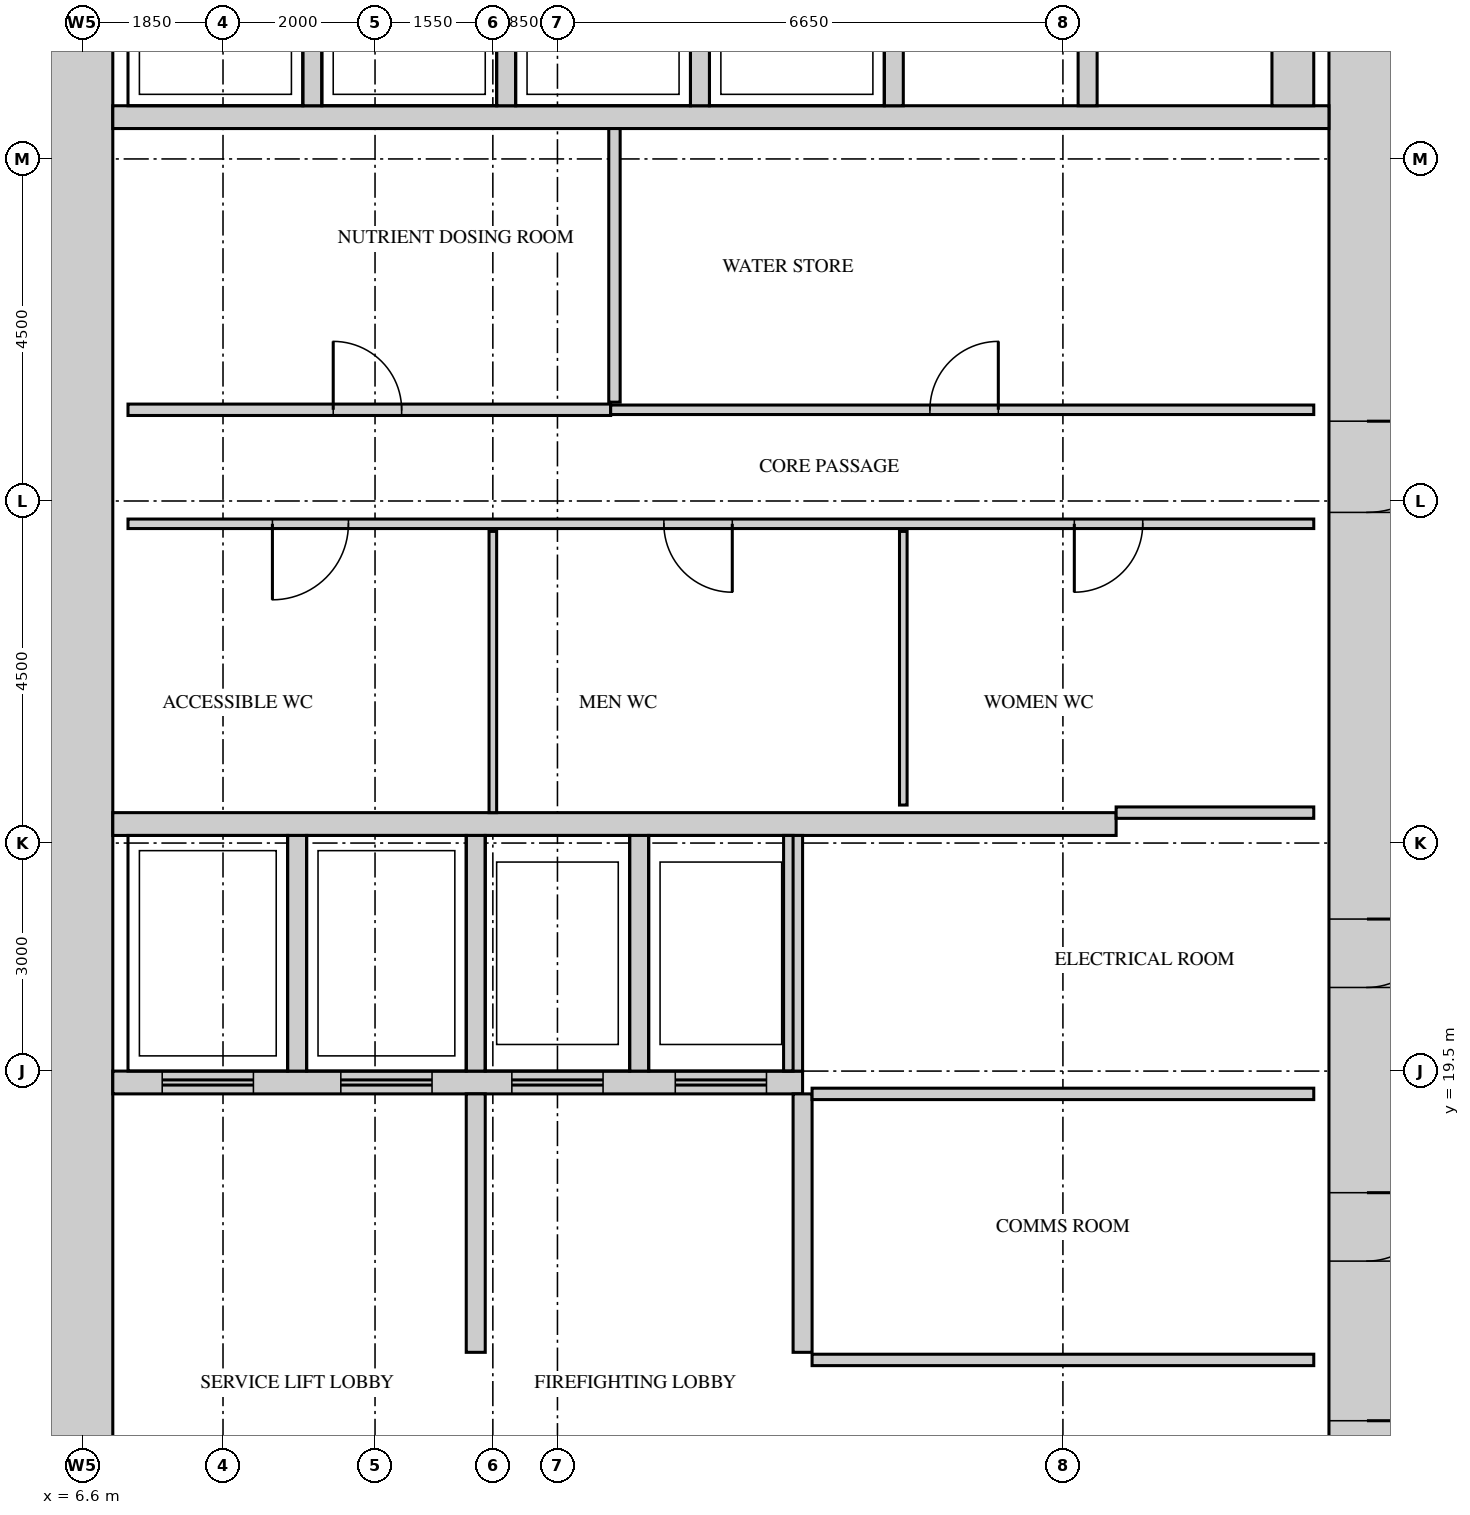
"""IFC4 building model, lengths in metres.
Left out: names, types, materials, properties, quantities, classifications, styles, units other than length and angle.
Written with IfcOpenShell. Run it as: python <this file> out.ifc"""

import sys

from ifc_helpers import new_model, si_unit, direction, frame, frame_2d, origin, place, context, subcontext, project, spatial, rectangle, extrude, source, transform, mapped, element, fill, save


model = new_model("IFC4")
c1 = context("Model", 3, precision=1e-05, world=origin(), true_north=direction((0.0, 1.0)))
c2 = subcontext(c1, "Body", "Model", "MODEL_VIEW")
j1 = project(units=[si_unit("LENGTHUNIT", "METRE"), si_unit("PLANEANGLEUNIT", "RADIAN")], contexts=[c1])
p1 = place(None, origin())
s1 = spatial("IfcSite", under=j1, at=p1, CompositionType="ELEMENT")
p2 = place(p1, origin())
s2 = spatial("IfcBuilding", under=s1, at=p2, CompositionType="ELEMENT")
p3 = place(p2, frame((0.0, 0.0, 110.3)))
s3 = spatial("IfcBuildingStorey", under=s2, at=p3, CompositionType="ELEMENT", Elevation=110.3)
m1 = source(origin(), c2, "Body", "SweptSolid", [
    extrude(rectangle(XDim=28.0, YDim=1.0, at=frame_2d((14.0, 0.0))), origin(), (0.0, 0.0, 1.0), 4.1),
])
p4 = place(p3, frame((23.5, 13.0, 0.0), z_axis=(0.0, 0.0, 1.0), x_axis=(0.0, 1.0, 0.0)))
e1 = element("IfcWall", 1, at=p4, inside=s3, PredefinedType="SHEAR", context=c2, shape_type="MappedRepresentation", body=[
    mapped(m1, transform((0.0, 0.0, 0.0))),
])
m2 = source(origin(), c2, "Body", "SweptSolid", [
    extrude(rectangle(XDim=1.8, YDim=2.1, at=frame_2d((0.9, 1.05))), frame((0.0, 0.51, 0.0), z_axis=(0.0, -1.0, 0.0), x_axis=(1.0, 0.0, 0.0)), (0.0, 0.0, 1.0), 1.02),
])
p5 = place(p4, frame((22.6, 0.0, 0.0)))
e2 = element("IfcOpeningElement", 2, at=p5, cuts=e1, PredefinedType="OPENING", context=c2, shape_type="MappedRepresentation", body=[
    mapped(m2, transform((0.0, 0.0, 0.0))),
])
m3 = source(origin(), c2, "Body", "SweptSolid", [
    extrude(rectangle(XDim=1.2, YDim=2.1, at=frame_2d((0.6, 1.05))), frame((0.0, 0.51, 0.0), z_axis=(0.0, -1.0, 0.0), x_axis=(1.0, 0.0, 0.0)), (0.0, 0.0, 1.0), 1.02),
])
p6 = place(p4, frame((13.85, 0.0, 0.0)))
e3 = element("IfcOpeningElement", 3, at=p6, cuts=e1, PredefinedType="OPENING", context=c2, shape_type="MappedRepresentation", body=[
    mapped(m3, transform((0.0, 0.0, 0.0))),
])
m4 = source(origin(), c2, "Body", "SweptSolid", [
    extrude(rectangle(XDim=0.9, YDim=2.1, at=frame_2d((0.45, 1.05))), frame((0.0, 0.51, 0.0), z_axis=(0.0, -1.0, 0.0), x_axis=(1.0, 0.0, 0.0)), (0.0, 0.0, 1.0), 1.02),
])
p7 = place(p4, frame((1.0, 0.0, 0.0)))
e4 = element("IfcOpeningElement", 4, at=p7, cuts=e1, PredefinedType="OPENING", context=c2, shape_type="MappedRepresentation", body=[
    mapped(m4, transform((0.0, 0.0, 0.0))),
])
p8 = place(p4, frame((4.0, 0.0, 0.0)))
e5 = element("IfcOpeningElement", 5, at=p8, cuts=e1, PredefinedType="OPENING", context=c2, shape_type="MappedRepresentation", body=[
    mapped(m4, transform((0.0, 0.0, 0.0))),
])
p9 = place(p4, frame((7.6, 0.0, 0.0)))
e6 = element("IfcOpeningElement", 6, at=p9, cuts=e1, PredefinedType="OPENING", context=c2, shape_type="MappedRepresentation", body=[
    mapped(m4, transform((0.0, 0.0, 0.0))),
])
p10 = place(p3, frame((6.5, 13.0, 0.0), z_axis=(0.0, 0.0, 1.0), x_axis=(0.0, 1.0, 0.0)))
e7 = element("IfcWall", 7, at=p10, inside=s3, PredefinedType="SHEAR", context=c2, shape_type="MappedRepresentation", body=[
    mapped(m1, transform((0.0, 0.0, 0.0))),
])
m5 = source(origin(), c2, "Body", "SweptSolid", [
    extrude(rectangle(XDim=13.2, YDim=0.3, at=frame_2d((6.6, 0.0))), origin(), (0.0, 0.0, 1.0), 4.1),
])
p11 = place(p3, frame((7.0, 22.75, 0.0), z_axis=(0.0, 0.0, 1.0), x_axis=(1.0, 0.0, 0.0)))
e8 = element("IfcWall", 8, at=p11, inside=s3, PredefinedType="STANDARD", context=c2, shape_type="MappedRepresentation", body=[
    mapped(m5, transform((0.0, 0.0, 0.0))),
])
m6 = source(origin(), c2, "Body", "SweptSolid", [
    extrude(rectangle(XDim=9.075, YDim=0.3, at=frame_2d((4.538, 0.0))), origin(), (0.0, 0.0, 1.0), 4.1),
])
p12 = place(p3, frame((7.0, 19.35, 0.0), z_axis=(0.0, 0.0, 1.0), x_axis=(1.0, 0.0, 0.0)))
e9 = element("IfcWall", 9, at=p12, inside=s3, PredefinedType="STANDARD", context=c2, shape_type="MappedRepresentation", body=[
    mapped(m6, transform((0.0, 0.0, 0.0))),
])
m7 = source(origin(), c2, "Body", "SweptSolid", [
    extrude(rectangle(XDim=1.2, YDim=2.1, at=frame_2d((0.6, 1.05))), frame((0.0, 0.16, 0.0), z_axis=(0.0, -1.0, 0.0), x_axis=(1.0, 0.0, 0.0)), (0.0, 0.0, 1.0), 0.32),
])
p13 = place(p12, frame((0.65, 0.0, 0.0)))
e10 = element("IfcOpeningElement", 10, at=p13, cuts=e9, PredefinedType="OPENING", context=c2, shape_type="MappedRepresentation", body=[
    mapped(m7, transform((0.0, 0.0, 0.0))),
])
p14 = place(p12, frame((3.0, 0.0, 0.0)))
e11 = element("IfcOpeningElement", 11, at=p14, cuts=e9, PredefinedType="OPENING", context=c2, shape_type="MappedRepresentation", body=[
    mapped(m7, transform((0.0, 0.0, 0.0))),
])
p15 = place(p12, frame((5.25, 0.0, 0.0)))
e12 = element("IfcOpeningElement", 12, at=p15, cuts=e9, PredefinedType="OPENING", context=c2, shape_type="MappedRepresentation", body=[
    mapped(m7, transform((0.0, 0.0, 0.0))),
])
p16 = place(p12, frame((7.4, 0.0, 0.0)))
e13 = element("IfcOpeningElement", 13, at=p16, cuts=e9, PredefinedType="OPENING", context=c2, shape_type="MappedRepresentation", body=[
    mapped(m7, transform((0.0, 0.0, 0.0))),
])
m8 = source(origin(), c2, "Body", "SweptSolid", [
    extrude(rectangle(XDim=16.0, YDim=0.3, at=frame_2d((8.0, 0.0))), origin(), (0.0, 0.0, 1.0), 4.1),
])
p17 = place(p3, frame((7.0, 32.05, 0.0), z_axis=(0.0, 0.0, 1.0), x_axis=(1.0, 0.0, 0.0)))
e14 = element("IfcWall", 14, at=p17, inside=s3, PredefinedType="STANDARD", context=c2, shape_type="MappedRepresentation", body=[
    mapped(m8, transform((0.0, 0.0, 0.0))),
])
m9 = source(origin(), c2, "Body", "SweptSolid", [
    extrude(rectangle(XDim=3.1, YDim=0.25, at=frame_2d((1.55, 0.0))), origin(), (0.0, 0.0, 1.0), 4.1),
])
for number, where, z_axis, x_axis in (
    (15, (9.425, 19.5, 0.0), (0.0, 0.0, 1.0), (0.0, 1.0, 0.0)),
    (16, (11.775, 19.5, 0.0), (0.0, 0.0, 1.0), (0.0, 1.0, 0.0)),
    (17, (13.925, 19.5, 0.0), (0.0, 0.0, 1.0), (0.0, 1.0, 0.0)),
    (18, (15.95, 19.5, 0.0), (0.0, 0.0, 1.0), (0.0, 1.0, 0.0)),
):
    element("IfcWall", number, at=place(p3, frame(where, z_axis=z_axis, x_axis=x_axis)), inside=s3, PredefinedType="STANDARD", context=c2, shape_type="MappedRepresentation", body=[
        mapped(m9, transform((0.0, 0.0, 0.0))),
    ])
m10 = source(origin(), c2, "Body", "SweptSolid", [
    extrude(rectangle(XDim=2.4, YDim=0.25, at=frame_2d((1.2, 0.0))), origin(), (0.0, 0.0, 1.0), 4.1),
])
for number, where, z_axis, x_axis in (
    (19, (9.625, 32.2, 0.0), (0.0, 0.0, 1.0), (0.0, 1.0, 0.0)),
    (20, (12.175, 32.2, 0.0), (0.0, 0.0, 1.0), (0.0, 1.0, 0.0)),
    (21, (14.725, 32.2, 0.0), (0.0, 0.0, 1.0), (0.0, 1.0, 0.0)),
    (22, (17.275, 32.2, 0.0), (0.0, 0.0, 1.0), (0.0, 1.0, 0.0)),
    (23, (19.825, 32.2, 0.0), (0.0, 0.0, 1.0), (0.0, 1.0, 0.0)),
):
    element("IfcWall", number, at=place(p3, frame(where, z_axis=z_axis, x_axis=x_axis)), inside=s3, PredefinedType="STANDARD", context=c2, shape_type="MappedRepresentation", body=[
        mapped(m10, transform((0.0, 0.0, 0.0))),
    ])
m11 = source(origin(), c2, "Body", "SweptSolid", [
    extrude(rectangle(XDim=2.4, YDim=0.55, at=frame_2d((1.2, 0.0))), origin(), (0.0, 0.0, 1.0), 4.1),
])
p18 = place(p3, frame((22.525, 32.2, 0.0), z_axis=(0.0, 0.0, 1.0), x_axis=(0.0, 1.0, 0.0)))
e24 = element("IfcWall", 24, at=p18, inside=s3, PredefinedType="STANDARD", context=c2, shape_type="MappedRepresentation", body=[
    mapped(m11, transform((0.0, 0.0, 0.0))),
])
m12 = source(origin(), c2, "Body", "SweptSolid", [
    extrude(rectangle(XDim=3.4, YDim=0.25, at=frame_2d((1.7, 0.0))), origin(), (0.0, 0.0, 1.0), 4.1),
])
for number, where, z_axis, x_axis in (
    (25, (16.075, 15.8, 0.0), (0.0, 0.0, 1.0), (0.0, 1.0, 0.0)),
    (26, (11.775, 15.8, 0.0), (0.0, 0.0, 1.0), (0.0, 1.0, 0.0)),
):
    element("IfcWall", number, at=place(p3, frame(where, z_axis=z_axis, x_axis=x_axis)), inside=s3, PredefinedType="STANDARD", context=c2, shape_type="MappedRepresentation", body=[
        mapped(m12, transform((0.0, 0.0, 0.0))),
    ])
m13 = source(origin(), c2, "Body", "SweptSolid", [
    extrude(rectangle(XDim=6.6, YDim=0.15, at=frame_2d((3.3, 0.0))), origin(), (0.0, 0.0, 1.0), 4.2),
])
for number, where, z_axis, x_axis in (
    (27, (16.2, 15.7, 0.0), (0.0, 0.0, 1.0), (1.0, 0.0, 0.0)),
    (28, (16.2, 19.2, 0.0), (0.0, 0.0, 1.0), (1.0, 0.0, 0.0)),
):
    element("IfcWall", number, at=place(p3, frame(where, z_axis=z_axis, x_axis=x_axis)), inside=s3, PredefinedType="PARTITIONING", context=c2, shape_type="MappedRepresentation", body=[
        mapped(m13, transform((0.0, 0.0, 0.0))),
    ])
m14 = source(origin(), c2, "Body", "SweptSolid", [
    extrude(rectangle(XDim=3.7, YDim=0.1, at=frame_2d((1.85, 0.0))), origin(), (0.0, 0.0, 1.0), 4.2),
])
p19 = place(p3, frame((12.0, 22.9, 0.0), z_axis=(0.0, 0.0, 1.0), x_axis=(0.0, 1.0, 0.0)))
e29 = element("IfcWall", 29, at=p19, inside=s3, PredefinedType="PARTITIONING", context=c2, shape_type="MappedRepresentation", body=[
    mapped(m14, transform((0.0, 0.0, 0.0))),
])
m15 = source(origin(), c2, "Body", "SweptSolid", [
    extrude(rectangle(XDim=2.6, YDim=0.15, at=frame_2d((1.3, 0.0))), origin(), (0.0, 0.0, 1.0), 4.2),
])
p20 = place(p3, frame((20.2, 22.9, 0.0), z_axis=(0.0, 0.0, 1.0), x_axis=(1.0, 0.0, 0.0)))
e30 = element("IfcWall", 30, at=p20, inside=s3, PredefinedType="PARTITIONING", context=c2, shape_type="MappedRepresentation", body=[
    mapped(m15, transform((0.0, 0.0, 0.0))),
])
m16 = source(origin(), c2, "Body", "SweptSolid", [
    extrude(rectangle(XDim=3.6, YDim=0.1, at=frame_2d((1.8, 0.0))), origin(), (0.0, 0.0, 1.0), 4.2),
])
p21 = place(p3, frame((17.4, 23.0, 0.0), z_axis=(0.0, 0.0, 1.0), x_axis=(0.0, 1.0, 0.0)))
e31 = element("IfcWall", 31, at=p21, inside=s3, PredefinedType="PARTITIONING", context=c2, shape_type="MappedRepresentation", body=[
    mapped(m16, transform((0.0, 0.0, 0.0))),
])
m17 = source(origin(), c2, "Body", "SweptSolid", [
    extrude(rectangle(XDim=15.6, YDim=0.125, at=frame_2d((7.8, 0.0))), origin(), (0.0, 0.0, 1.0), 4.2),
])
p22 = place(p3, frame((7.2, 26.7, 0.0), z_axis=(0.0, 0.0, 1.0), x_axis=(1.0, 0.0, 0.0)))
e32 = element("IfcWall", 32, at=p22, inside=s3, PredefinedType="PARTITIONING", context=c2, shape_type="MappedRepresentation", body=[
    mapped(m17, transform((0.0, 0.0, 0.0))),
])
m18 = source(origin(), c2, "Body", "SweptSolid", [
    extrude(rectangle(XDim=1.0, YDim=2.1, at=frame_2d((0.5, 1.05))), frame((0.0, 0.073, 0.0), z_axis=(0.0, -1.0, 0.0), x_axis=(1.0, 0.0, 0.0)), (0.0, 0.0, 1.0), 0.145),
])
p23 = place(p22, frame((1.9, 0.0, 0.0)))
e33 = element("IfcOpeningElement", 33, at=p23, cuts=e32, PredefinedType="OPENING", context=c2, shape_type="MappedRepresentation", body=[
    mapped(m18, transform((0.0, 0.0, 0.0))),
])
m19 = source(origin(), c2, "Body", "SweptSolid", [
    extrude(rectangle(XDim=0.9, YDim=2.1, at=frame_2d((0.45, 1.05))), frame((0.0, 0.073, 0.0), z_axis=(0.0, -1.0, 0.0), x_axis=(1.0, 0.0, 0.0)), (0.0, 0.0, 1.0), 0.145),
])
p24 = place(p22, frame((7.05, 0.0, 0.0)))
e34 = element("IfcOpeningElement", 34, at=p24, cuts=e32, PredefinedType="OPENING", context=c2, shape_type="MappedRepresentation", body=[
    mapped(m19, transform((0.0, 0.0, 0.0))),
])
p25 = place(p22, frame((12.45, 0.0, 0.0)))
e35 = element("IfcOpeningElement", 35, at=p25, cuts=e32, PredefinedType="OPENING", context=c2, shape_type="MappedRepresentation", body=[
    mapped(m19, transform((0.0, 0.0, 0.0))),
])
m20 = source(origin(), c2, "Body", "SweptSolid", [
    extrude(rectangle(XDim=6.35, YDim=0.15, at=frame_2d((3.175, 0.0))), origin(), (0.0, 0.0, 1.0), 4.2),
])
p26 = place(p3, frame((7.2, 28.2, 0.0), z_axis=(0.0, 0.0, 1.0), x_axis=(1.0, 0.0, 0.0)))
e36 = element("IfcWall", 36, at=p26, inside=s3, PredefinedType="PARTITIONING", context=c2, shape_type="MappedRepresentation", body=[
    mapped(m20, transform((0.0, 0.0, 0.0))),
])
m21 = source(origin(), c2, "Body", "SweptSolid", [
    extrude(rectangle(XDim=0.9, YDim=2.1, at=frame_2d((0.45, 1.05))), frame((0.0, 0.085, 0.0), z_axis=(0.0, -1.0, 0.0), x_axis=(1.0, 0.0, 0.0)), (0.0, 0.0, 1.0), 0.17),
])
p27 = place(p26, frame((2.7, 0.0, 0.0)))
e37 = element("IfcOpeningElement", 37, at=p27, cuts=e36, PredefinedType="OPENING", context=c2, shape_type="MappedRepresentation", body=[
    mapped(m21, transform((0.0, 0.0, 0.0))),
])
m22 = source(origin(), c2, "Body", "SweptSolid", [
    extrude(rectangle(XDim=9.25, YDim=0.125, at=frame_2d((4.625, 0.0))), origin(), (0.0, 0.0, 1.0), 4.2),
])
p28 = place(p3, frame((13.55, 28.2, 0.0), z_axis=(0.0, 0.0, 1.0), x_axis=(1.0, 0.0, 0.0)))
e38 = element("IfcWall", 38, at=p28, inside=s3, PredefinedType="PARTITIONING", context=c2, shape_type="MappedRepresentation", body=[
    mapped(m22, transform((0.0, 0.0, 0.0))),
])
p29 = place(p28, frame((4.2, 0.0, 0.0)))
e39 = element("IfcOpeningElement", 39, at=p29, cuts=e38, PredefinedType="OPENING", context=c2, shape_type="MappedRepresentation", body=[
    mapped(m19, transform((0.0, 0.0, 0.0))),
])
m23 = source(origin(), c2, "Body", "SweptSolid", [
    extrude(rectangle(XDim=3.6, YDim=0.15, at=frame_2d((1.8, 0.0))), origin(), (0.0, 0.0, 1.0), 4.2),
])
p30 = place(p3, frame((13.6, 28.3, 0.0), z_axis=(0.0, 0.0, 1.0), x_axis=(0.0, 1.0, 0.0)))
e40 = element("IfcWall", 40, at=p30, inside=s3, PredefinedType="PARTITIONING", context=c2, shape_type="MappedRepresentation", body=[
    mapped(m23, transform((0.0, 0.0, 0.0))),
])
m24 = source(origin(), c2, "Body", "SweptSolid", [
    extrude(rectangle(XDim=1.2, YDim=2.1, at=frame_2d((0.6, 1.05))), frame((0.0, 0.45, 0.0), z_axis=(0.0, -1.0, 0.0), x_axis=(1.0, 0.0, 0.0)), (0.0, 0.0, 1.0), 0.9),
])
p31 = place(p6, origin())
e41 = element("IfcDoor", 41, at=p31, inside=s3, OperationType="SINGLE_SWING_RIGHT", PredefinedType="DOOR", context=c2, shape_type="MappedRepresentation", body=[
    mapped(m24, transform((0.0, 0.0, 0.0))),
])
fill(e3, e41)
m25 = source(origin(), c2, "Body", "SweptSolid", [
    extrude(rectangle(XDim=0.9, YDim=2.1, at=frame_2d((0.45, 1.05))), frame((0.0, 0.025, 0.0), z_axis=(0.0, -1.0, 0.0), x_axis=(1.0, 0.0, 0.0)), (0.0, 0.0, 1.0), 0.05),
])
p32 = place(p27, origin())
e42 = element("IfcDoor", 42, at=p32, inside=s3, OperationType="SINGLE_SWING_RIGHT", PredefinedType="DOOR", context=c2, shape_type="MappedRepresentation", body=[
    mapped(m25, transform((0.0, 0.0, 0.0))),
])
fill(e37, e42)
p33 = place(p29, origin())
e43 = element("IfcDoor", 43, at=p33, inside=s3, OperationType="SINGLE_SWING_LEFT", PredefinedType="DOOR", context=c2, shape_type="MappedRepresentation", body=[
    mapped(m25, transform((0.0, 0.0, 0.0))),
])
fill(e39, e43)
m26 = source(origin(), c2, "Body", "SweptSolid", [
    extrude(rectangle(XDim=1.0, YDim=2.1, at=frame_2d((0.5, 1.05))), frame((0.0, 0.025, 0.0), z_axis=(0.0, -1.0, 0.0), x_axis=(1.0, 0.0, 0.0)), (0.0, 0.0, 1.0), 0.05),
])
p34 = place(p23, origin())
e44 = element("IfcDoor", 44, at=p34, inside=s3, OperationType="SINGLE_SWING_LEFT", PredefinedType="DOOR", context=c2, shape_type="MappedRepresentation", body=[
    mapped(m26, transform((0.0, 0.0, 0.0))),
])
fill(e33, e44)
p35 = place(p24, origin())
e45 = element("IfcDoor", 45, at=p35, inside=s3, OperationType="SINGLE_SWING_RIGHT", PredefinedType="DOOR", context=c2, shape_type="MappedRepresentation", body=[
    mapped(m25, transform((0.0, 0.0, 0.0))),
])
fill(e34, e45)
p36 = place(p25, origin())
e46 = element("IfcDoor", 46, at=p36, inside=s3, OperationType="SINGLE_SWING_LEFT", PredefinedType="DOOR", context=c2, shape_type="MappedRepresentation", body=[
    mapped(m25, transform((0.0, 0.0, 0.0))),
])
fill(e35, e46)
m27 = source(origin(), c2, "Body", "SweptSolid", [
    extrude(rectangle(XDim=0.9, YDim=2.1, at=frame_2d((0.45, 1.05))), frame((0.0, 0.45, 0.0), z_axis=(0.0, -1.0, 0.0), x_axis=(1.0, 0.0, 0.0)), (0.0, 0.0, 1.0), 0.9),
])
p37 = place(p7, origin())
e47 = element("IfcDoor", 47, at=p37, inside=s3, OperationType="SINGLE_SWING_RIGHT", PredefinedType="DOOR", context=c2, shape_type="MappedRepresentation", body=[
    mapped(m27, transform((0.0, 0.0, 0.0))),
])
fill(e4, e47)
p38 = place(p8, origin())
e48 = element("IfcDoor", 48, at=p38, inside=s3, OperationType="SINGLE_SWING_RIGHT", PredefinedType="DOOR", context=c2, shape_type="MappedRepresentation", body=[
    mapped(m27, transform((0.0, 0.0, 0.0))),
])
fill(e5, e48)
p39 = place(p9, origin())
e49 = element("IfcDoor", 49, at=p39, inside=s3, OperationType="SINGLE_SWING_RIGHT", PredefinedType="DOOR", context=c2, shape_type="MappedRepresentation", body=[
    mapped(m27, transform((0.0, 0.0, 0.0))),
])
fill(e6, e49)
m28 = source(origin(), c2, "Body", "SweptSolid", [
    extrude(rectangle(XDim=1.2, YDim=2.1, at=frame_2d((0.6, 1.05))), frame((0.0, 0.025, 0.0), z_axis=(0.0, -1.0, 0.0), x_axis=(1.0, 0.0, 0.0)), (0.0, 0.0, 1.0), 0.05),
])
p40 = place(p13, origin())
e50 = element("IfcDoor", 50, at=p40, inside=s3, OperationType="DOUBLE_DOOR_SLIDING", PredefinedType="DOOR", context=c2, shape_type="MappedRepresentation", body=[
    mapped(m28, transform((0.0, 0.0, 0.0))),
])
fill(e10, e50)
p41 = place(p14, origin())
e51 = element("IfcDoor", 51, at=p41, inside=s3, OperationType="DOUBLE_DOOR_SLIDING", PredefinedType="DOOR", context=c2, shape_type="MappedRepresentation", body=[
    mapped(m28, transform((0.0, 0.0, 0.0))),
])
fill(e11, e51)
p42 = place(p15, origin())
e52 = element("IfcDoor", 52, at=p42, inside=s3, OperationType="DOUBLE_DOOR_SLIDING", PredefinedType="DOOR", context=c2, shape_type="MappedRepresentation", body=[
    mapped(m28, transform((0.0, 0.0, 0.0))),
])
fill(e12, e52)
p43 = place(p16, origin())
e53 = element("IfcDoor", 53, at=p43, inside=s3, OperationType="DOUBLE_DOOR_SLIDING", PredefinedType="DOOR", context=c2, shape_type="MappedRepresentation", body=[
    mapped(m28, transform((0.0, 0.0, 0.0))),
])
fill(e13, e53)
save(model, sys.argv[1])
